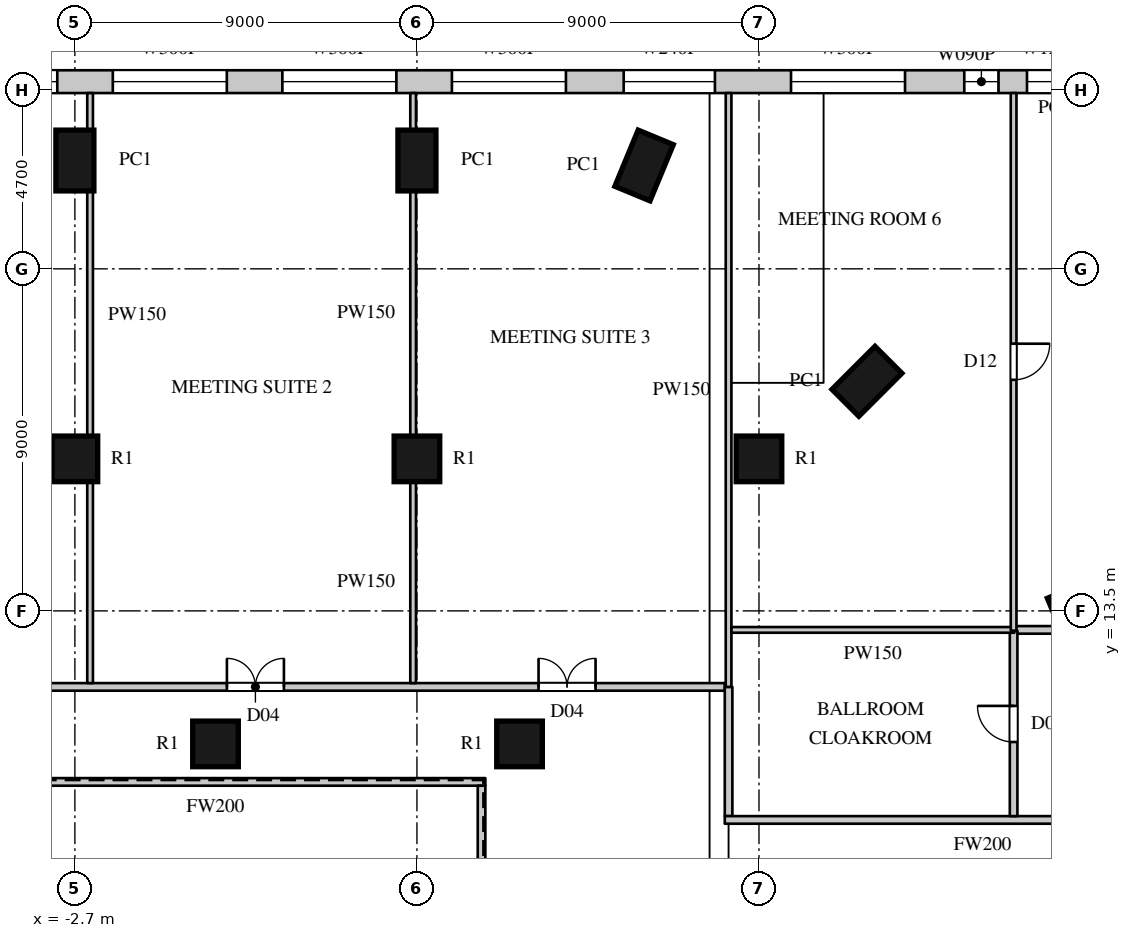
"""IFC4 building model, lengths in metres.
Left out: names, types, materials, properties, quantities, classifications, styles, units other than length and angle.
Written with IfcOpenShell. Run it as: python <this file> out.ifc"""

import sys

from ifc_helpers import new_model, si_unit, direction, frame, frame_2d, origin, origin_2d, place, context, subcontext, project, spatial, rectangle, circle, extrude, element, fill, save


model = new_model("IFC4")
c1 = context("Model", 3, precision=1e-05, world=origin(), true_north=direction((0.0, 1.0)))
c2 = subcontext(c1, "Body", "Model", "MODEL_VIEW")
j1 = project(units=[si_unit("LENGTHUNIT", "METRE"), si_unit("PLANEANGLEUNIT", "RADIAN")], contexts=[c1])
p1 = place(None, origin())
s1 = spatial("IfcSite", under=j1, at=p1, CompositionType="ELEMENT")
p2 = place(p1, origin())
s2 = spatial("IfcBuilding", under=s1, at=p2, CompositionType="ELEMENT")
p3 = place(p2, frame((0.0, 0.0, 36.0)))
s3 = spatial("IfcBuildingStorey", under=s2, at=p3, CompositionType="ELEMENT", Elevation=36.0)
for number, where, z_axis, x_axis in (
    (1, (23.82, 13.677, 0.0), (0.0, 0.0, 1.0), (-0.383, 0.924, 0.0)),
    (2, (18.14, 19.54, 0.0), (0.0, 0.0, 1.0), (-0.707, 0.707, 0.0)),
    (3, (12.277, 25.219, 0.0), (0.0, 0.0, 1.0), (-0.924, 0.383, 0.0)),
    (4, (6.3, 25.35, 0.0), (0.0, 0.0, 1.0), (-1.0, 0.0, 0.0)),
    (5, (-2.7, 25.35, 0.0), (0.0, 0.0, 1.0), (-1.0, 0.0, 0.0)),
):
    element("IfcColumn", number, at=place(p3, frame(where, z_axis=z_axis, x_axis=x_axis)), inside=s3, PredefinedType="COLUMN", context=c2, shape_type="SweptSolid", body=[
        extrude(rectangle(XDim=1.0, YDim=1.6, at=origin_2d()), origin(), (0.0, 0.0, 1.0), 8.0),
    ])
for number, where, z_axis, x_axis in (
    (6, (-2.7, 17.5, 0.0), (0.0, 0.0, 1.0), (1.0, 0.0, 0.0)),
    (7, (6.3, 17.5, 0.0), (0.0, 0.0, 1.0), (1.0, 0.0, 0.0)),
    (8, (15.3, 17.5, 0.0), (0.0, 0.0, 1.0), (1.0, 0.0, 0.0)),
    (9, (1.0, 10.0, 0.0), (0.0, 0.0, 1.0), (1.0, 0.0, 0.0)),
    (10, (9.0, 10.0, 0.0), (0.0, 0.0, 1.0), (1.0, 0.0, 0.0)),
):
    element("IfcColumn", number, at=place(p3, frame(where, z_axis=z_axis, x_axis=x_axis)), inside=s3, PredefinedType="COLUMN", context=c2, shape_type="SweptSolid", body=[
        extrude(circle(Radius=0.6, at=origin_2d()), origin(), (0.0, 0.0, 1.0), 8.0),
    ])
p4 = place(p3, frame((24.334, 27.425, 0.0), z_axis=(0.0, 0.0, 1.0), x_axis=(-1.0, 0.0, 0.0)))
e11 = element("IfcWall", 11, at=p4, inside=s3, PredefinedType="ELEMENTEDWALL", context=c2, shape_type="SweptSolid", body=[
    extrude(rectangle(XDim=53.534, YDim=0.6, at=frame_2d((26.767, 0.0))), origin(), (0.0, 0.0, 1.0), 7.6),
])
p5 = place(p4, frame((5.192, 0.0, 1.5)))
e12 = element("IfcOpeningElement", 12, at=p5, cuts=e11, PredefinedType="OPENING", context=c2, shape_type="SweptSolid", body=[
    extrude(rectangle(XDim=3.0, YDim=2.4, at=frame_2d((1.5, 1.2))), frame((0.0, 0.31, 0.0), z_axis=(0.0, -1.0, 0.0), x_axis=(1.0, 0.0, 0.0)), (0.0, 0.0, 1.0), 0.62),
])
p6 = place(p4, frame((14.114, 0.0, 1.5)))
e13 = element("IfcOpeningElement", 13, at=p6, cuts=e11, PredefinedType="OPENING", context=c2, shape_type="SweptSolid", body=[
    extrude(rectangle(XDim=3.0, YDim=2.4, at=frame_2d((1.5, 1.2))), frame((0.0, 0.31, 0.0), z_axis=(0.0, -1.0, 0.0), x_axis=(1.0, 0.0, 0.0)), (0.0, 0.0, 1.0), 0.62),
])
p7 = place(p4, frame((18.575, 0.0, 1.5)))
e14 = element("IfcOpeningElement", 14, at=p7, cuts=e11, PredefinedType="OPENING", context=c2, shape_type="SweptSolid", body=[
    extrude(rectangle(XDim=3.0, YDim=2.4, at=frame_2d((1.5, 1.2))), frame((0.0, 0.31, 0.0), z_axis=(0.0, -1.0, 0.0), x_axis=(1.0, 0.0, 0.0)), (0.0, 0.0, 1.0), 0.62),
])
p8 = place(p4, frame((23.037, 0.0, 1.5)))
e15 = element("IfcOpeningElement", 15, at=p8, cuts=e11, PredefinedType="OPENING", context=c2, shape_type="SweptSolid", body=[
    extrude(rectangle(XDim=3.0, YDim=2.4, at=frame_2d((1.5, 1.2))), frame((0.0, 0.31, 0.0), z_axis=(0.0, -1.0, 0.0), x_axis=(1.0, 0.0, 0.0)), (0.0, 0.0, 1.0), 0.62),
])
p9 = place(p4, frame((27.498, 0.0, 1.5)))
e16 = element("IfcOpeningElement", 16, at=p9, cuts=e11, PredefinedType="OPENING", context=c2, shape_type="SweptSolid", body=[
    extrude(rectangle(XDim=3.0, YDim=2.4, at=frame_2d((1.5, 1.2))), frame((0.0, 0.31, 0.0), z_axis=(0.0, -1.0, 0.0), x_axis=(1.0, 0.0, 0.0)), (0.0, 0.0, 1.0), 0.62),
])
p10 = place(p4, frame((36.42, 0.0, 1.5)))
e17 = element("IfcOpeningElement", 17, at=p10, cuts=e11, PredefinedType="OPENING", context=c2, shape_type="SweptSolid", body=[
    extrude(rectangle(XDim=3.0, YDim=2.4, at=frame_2d((1.5, 1.2))), frame((0.0, 0.31, 0.0), z_axis=(0.0, -1.0, 0.0), x_axis=(1.0, 0.0, 0.0)), (0.0, 0.0, 1.0), 0.62),
])
p11 = place(p4, frame((40.882, 0.0, 1.5)))
e18 = element("IfcOpeningElement", 18, at=p11, cuts=e11, PredefinedType="OPENING", context=c2, shape_type="SweptSolid", body=[
    extrude(rectangle(XDim=3.0, YDim=2.4, at=frame_2d((1.5, 1.2))), frame((0.0, 0.31, 0.0), z_axis=(0.0, -1.0, 0.0), x_axis=(1.0, 0.0, 0.0)), (0.0, 0.0, 1.0), 0.62),
])
p12 = place(p4, frame((45.343, 0.0, 1.5)))
e19 = element("IfcOpeningElement", 19, at=p12, cuts=e11, PredefinedType="OPENING", context=c2, shape_type="SweptSolid", body=[
    extrude(rectangle(XDim=3.0, YDim=2.4, at=frame_2d((1.5, 1.2))), frame((0.0, 0.31, 0.0), z_axis=(0.0, -1.0, 0.0), x_axis=(1.0, 0.0, 0.0)), (0.0, 0.0, 1.0), 0.62),
])
p13 = place(p4, frame((49.804, 0.0, 1.5)))
e20 = element("IfcOpeningElement", 20, at=p13, cuts=e11, PredefinedType="OPENING", context=c2, shape_type="SweptSolid", body=[
    extrude(rectangle(XDim=3.0, YDim=2.4, at=frame_2d((1.5, 1.2))), frame((0.0, 0.31, 0.0), z_axis=(0.0, -1.0, 0.0), x_axis=(1.0, 0.0, 0.0)), (0.0, 0.0, 1.0), 0.62),
])
p14 = place(p4, frame((0.782, 0.0, 1.5)))
e21 = element("IfcOpeningElement", 21, at=p14, cuts=e11, PredefinedType="OPENING", context=c2, shape_type="SweptSolid", body=[
    extrude(rectangle(XDim=1.2, YDim=2.4, at=frame_2d((0.6, 1.2))), frame((0.0, 0.31, 0.0), z_axis=(0.0, -1.0, 0.0), x_axis=(1.0, 0.0, 0.0)), (0.0, 0.0, 1.0), 0.62),
])
p15 = place(p4, frame((2.733, 0.0, 1.5)))
e22 = element("IfcOpeningElement", 22, at=p15, cuts=e11, PredefinedType="OPENING", context=c2, shape_type="SweptSolid", body=[
    extrude(rectangle(XDim=0.9, YDim=2.4, at=frame_2d((0.45, 1.2))), frame((0.0, 0.31, 0.0), z_axis=(0.0, -1.0, 0.0), x_axis=(1.0, 0.0, 0.0)), (0.0, 0.0, 1.0), 0.62),
])
p16 = place(p4, frame((10.194, 0.0, 1.5)))
e23 = element("IfcOpeningElement", 23, at=p16, cuts=e11, PredefinedType="OPENING", context=c2, shape_type="SweptSolid", body=[
    extrude(rectangle(XDim=2.4, YDim=2.4, at=frame_2d((1.2, 1.2))), frame((0.0, 0.31, 0.0), z_axis=(0.0, -1.0, 0.0), x_axis=(1.0, 0.0, 0.0)), (0.0, 0.0, 1.0), 0.62),
])
p17 = place(p4, frame((32.047, 0.0, 1.5)))
e24 = element("IfcOpeningElement", 24, at=p17, cuts=e11, PredefinedType="OPENING", context=c2, shape_type="SweptSolid", body=[
    extrude(rectangle(XDim=2.4, YDim=2.4, at=frame_2d((1.2, 1.2))), frame((0.0, 0.31, 0.0), z_axis=(0.0, -1.0, 0.0), x_axis=(1.0, 0.0, 0.0)), (0.0, 0.0, 1.0), 0.62),
])
p18 = place(p3, frame((-10.4, 11.5, 0.0), z_axis=(0.0, 0.0, 1.0), x_axis=(1.0, 0.0, 0.0)))
e25 = element("IfcWall", 25, at=p18, inside=s3, PredefinedType="PARTITIONING", context=c2, shape_type="SweptSolid", body=[
    extrude(rectangle(XDim=24.8, YDim=0.2, at=frame_2d((12.4, 0.0))), origin(), (0.0, 0.0, 1.0), 7.598),
])
p19 = place(p18, frame((3.7, 0.0, 0.0)))
e26 = element("IfcOpeningElement", 26, at=p19, cuts=e25, PredefinedType="OPENING", context=c2, shape_type="SweptSolid", body=[
    extrude(rectangle(XDim=1.5, YDim=2.2, at=frame_2d((0.75, 1.1))), frame((0.0, 0.11, 0.0), z_axis=(0.0, -1.0, 0.0), x_axis=(1.0, 0.0, 0.0)), (0.0, 0.0, 1.0), 0.22),
])
p20 = place(p18, frame((11.7, 0.0, 0.0)))
e27 = element("IfcOpeningElement", 27, at=p20, cuts=e25, PredefinedType="OPENING", context=c2, shape_type="SweptSolid", body=[
    extrude(rectangle(XDim=1.5, YDim=2.2, at=frame_2d((0.75, 1.1))), frame((0.0, 0.11, 0.0), z_axis=(0.0, -1.0, 0.0), x_axis=(1.0, 0.0, 0.0)), (0.0, 0.0, 1.0), 0.22),
])
p21 = place(p18, frame((19.9, 0.0, 0.0)))
e28 = element("IfcOpeningElement", 28, at=p21, cuts=e25, PredefinedType="OPENING", context=c2, shape_type="SweptSolid", body=[
    extrude(rectangle(XDim=1.5, YDim=2.2, at=frame_2d((0.75, 1.1))), frame((0.0, 0.11, 0.0), z_axis=(0.0, -1.0, 0.0), x_axis=(1.0, 0.0, 0.0)), (0.0, 0.0, 1.0), 0.22),
])
p22 = place(p3, frame((-6.1, 9.0, 0.0), z_axis=(0.0, 0.0, 1.0), x_axis=(1.0, 0.0, 0.0)))
e29 = element("IfcWall", 29, at=p22, inside=s3, PredefinedType="PARTITIONING", context=c2, shape_type="SweptSolid", body=[
    extrude(rectangle(XDim=14.2, YDim=0.2, at=frame_2d((7.1, 0.0))), origin(), (0.0, 0.0, 1.0), 7.598),
])
p23 = place(p3, frame((8.0, -8.9, 0.0), z_axis=(0.0, 0.0, 1.0), x_axis=(0.0, 1.0, 0.0)))
e30 = element("IfcWall", 30, at=p23, inside=s3, PredefinedType="PARTITIONING", context=c2, shape_type="SweptSolid", body=[
    extrude(rectangle(XDim=17.8, YDim=0.2, at=frame_2d((8.9, 0.0))), origin(), (0.0, 0.0, 1.0), 7.598),
])
p24 = place(p3, frame((14.5, 8.1, 0.0), z_axis=(0.0, 0.0, 1.0), x_axis=(0.0, 1.0, 0.0)))
e31 = element("IfcWall", 31, at=p24, inside=s3, PredefinedType="PARTITIONING", context=c2, shape_type="SweptSolid", body=[
    extrude(rectangle(XDim=3.4, YDim=0.2, at=frame_2d((1.7, 0.0))), origin(), (0.0, 0.0, 1.0), 7.598),
])
p25 = place(p3, frame((14.4, 8.0, 0.0), z_axis=(0.0, 0.0, 1.0), x_axis=(1.0, 0.0, 0.0)))
e32 = element("IfcWall", 32, at=p25, inside=s3, PredefinedType="PARTITIONING", context=c2, shape_type="SweptSolid", body=[
    extrude(rectangle(XDim=13.57, YDim=0.2, at=frame_2d((6.785, 0.0))), origin(), (0.0, 0.0, 1.0), 7.598),
])
p26 = place(p25, frame((9.75, 0.0, 0.0)))
e33 = element("IfcOpeningElement", 33, at=p26, cuts=e32, PredefinedType="OPENING", context=c2, shape_type="SweptSolid", body=[
    extrude(rectangle(XDim=1.5, YDim=2.4, at=frame_2d((0.75, 1.2))), frame((0.0, 0.11, 0.0), z_axis=(0.0, -1.0, 0.0), x_axis=(1.0, 0.0, 0.0)), (0.0, 0.0, 1.0), 0.22),
])
p27 = place(p3, frame((22.02, 13.0, 0.0), z_axis=(0.0, 0.0, 1.0), x_axis=(1.0, 0.0, 0.0)))
e34 = element("IfcWall", 34, at=p27, inside=s3, PredefinedType="PARTITIONING", context=c2, shape_type="SweptSolid", body=[
    extrude(rectangle(XDim=1.184, YDim=0.2, at=frame_2d((0.592, 0.0))), origin(), (0.0, 0.0, 1.0), 7.598),
])
p28 = place(p3, frame((22.0, 8.1, 0.0), z_axis=(0.0, 0.0, 1.0), x_axis=(0.0, 1.0, 0.0)))
e35 = element("IfcWall", 35, at=p28, inside=s3, PredefinedType="PARTITIONING", context=c2, shape_type="SweptSolid", body=[
    extrude(rectangle(XDim=4.88, YDim=0.2, at=frame_2d((2.44, 0.0))), origin(), (0.0, 0.0, 1.0), 7.598),
])
p29 = place(p28, frame((1.95, 0.0, 0.0)))
e36 = element("IfcOpeningElement", 36, at=p29, cuts=e35, PredefinedType="OPENING", context=c2, shape_type="SweptSolid", body=[
    extrude(rectangle(XDim=0.95, YDim=2.2, at=frame_2d((0.475, 1.1))), frame((0.0, 0.11, 0.0), z_axis=(0.0, -1.0, 0.0), x_axis=(1.0, 0.0, 0.0)), (0.0, 0.0, 1.0), 0.22),
])
p30 = place(p3, frame((-2.3, 11.6, 0.0), z_axis=(0.0, 0.0, 1.0), x_axis=(0.0, 1.0, 0.0)))
e37 = element("IfcWall", 37, at=p30, inside=s3, PredefinedType="PARTITIONING", context=c2, shape_type="SweptSolid", body=[
    extrude(rectangle(XDim=5.406, YDim=0.15, at=frame_2d((2.703, 0.0))), origin(), (0.0, 0.0, 1.0), 7.598),
])
p31 = place(p3, frame((-2.3, 17.994, 0.0), z_axis=(0.0, 0.0, 1.0), x_axis=(0.0, 1.0, 0.0)))
e38 = element("IfcWall", 38, at=p31, inside=s3, PredefinedType="PARTITIONING", context=c2, shape_type="SweptSolid", body=[
    extrude(rectangle(XDim=6.556, YDim=0.15, at=frame_2d((3.278, 0.0))), origin(), (0.0, 0.0, 1.0), 7.598),
])
p32 = place(p3, frame((-2.3, 26.15, 0.0), z_axis=(0.0, 0.0, 1.0), x_axis=(0.0, 1.0, 0.0)))
e39 = element("IfcWall", 39, at=p32, inside=s3, PredefinedType="PARTITIONING", context=c2, shape_type="SweptSolid", body=[
    extrude(rectangle(XDim=0.975, YDim=0.15, at=frame_2d((0.488, 0.0))), origin(), (0.0, 0.0, 1.0), 7.598),
])
p33 = place(p3, frame((6.2, 11.6, 0.0), z_axis=(0.0, 0.0, 1.0), x_axis=(0.0, 1.0, 0.0)))
e40 = element("IfcWall", 40, at=p33, inside=s3, PredefinedType="PARTITIONING", context=c2, shape_type="SweptSolid", body=[
    extrude(rectangle(XDim=5.3, YDim=0.15, at=frame_2d((2.65, 0.0))), origin(), (0.0, 0.0, 1.0), 7.598),
])
p34 = place(p3, frame((6.2, 18.1, 0.0), z_axis=(0.0, 0.0, 1.0), x_axis=(0.0, 1.0, 0.0)))
e41 = element("IfcWall", 41, at=p34, inside=s3, PredefinedType="PARTITIONING", context=c2, shape_type="SweptSolid", body=[
    extrude(rectangle(XDim=6.45, YDim=0.15, at=frame_2d((3.225, 0.0))), origin(), (0.0, 0.0, 1.0), 7.598),
])
p35 = place(p3, frame((6.2, 26.15, 0.0), z_axis=(0.0, 0.0, 1.0), x_axis=(0.0, 1.0, 0.0)))
e42 = element("IfcWall", 42, at=p35, inside=s3, PredefinedType="PARTITIONING", context=c2, shape_type="SweptSolid", body=[
    extrude(rectangle(XDim=0.975, YDim=0.15, at=frame_2d((0.488, 0.0))), origin(), (0.0, 0.0, 1.0), 7.598),
])
p36 = place(p3, frame((14.5, 11.5, 0.0), z_axis=(0.0, 0.0, 1.0), x_axis=(0.0, 1.0, 0.0)))
e43 = element("IfcWall", 43, at=p36, inside=s3, PredefinedType="PARTITIONING", context=c2, shape_type="SweptSolid", body=[
    extrude(rectangle(XDim=15.625, YDim=0.15, at=frame_2d((7.812, 0.0))), origin(), (0.0, 0.0, 1.0), 7.598),
])
p37 = place(p3, frame((14.575, 13.0, 0.0), z_axis=(0.0, 0.0, 1.0), x_axis=(1.0, 0.0, 0.0)))
e44 = element("IfcWall", 44, at=p37, inside=s3, PredefinedType="PARTITIONING", context=c2, shape_type="SweptSolid", body=[
    extrude(rectangle(XDim=7.445, YDim=0.15, at=frame_2d((3.723, 0.0))), origin(), (0.0, 0.0, 1.0), 7.598),
])
p38 = place(p3, frame((22.0, 12.98, 0.0), z_axis=(0.0, 0.0, 1.0), x_axis=(0.0, 1.0, 0.0)))
e45 = element("IfcWall", 45, at=p38, inside=s3, PredefinedType="PARTITIONING", context=c2, shape_type="SweptSolid", body=[
    extrude(rectangle(XDim=14.145, YDim=0.15, at=frame_2d((7.073, 0.0))), origin(), (0.0, 0.0, 1.0), 7.598),
])
p39 = place(p38, frame((6.6, 0.0, 0.0)))
e46 = element("IfcOpeningElement", 46, at=p39, cuts=e45, PredefinedType="OPENING", context=c2, shape_type="SweptSolid", body=[
    extrude(rectangle(XDim=0.95, YDim=2.2, at=frame_2d((0.475, 1.1))), frame((0.0, 0.085, 0.0), z_axis=(0.0, -1.0, 0.0), x_axis=(1.0, 0.0, 0.0)), (0.0, 0.0, 1.0), 0.17),
])
p40 = place(p5, origin())
e47 = element("IfcWindow", 47, at=p40, inside=s3, PartitioningType="SINGLE_PANEL", PredefinedType="WINDOW", context=c2, shape_type="SweptSolid", body=[
    extrude(rectangle(XDim=3.0, YDim=2.4, at=frame_2d((1.5, 1.2))), frame((0.0, 0.06, 0.0), z_axis=(0.0, -1.0, 0.0), x_axis=(1.0, 0.0, 0.0)), (0.0, 0.0, 1.0), 0.06),
])
fill(e12, e47)
p41 = place(p6, origin())
e48 = element("IfcWindow", 48, at=p41, inside=s3, PartitioningType="SINGLE_PANEL", PredefinedType="WINDOW", context=c2, shape_type="SweptSolid", body=[
    extrude(rectangle(XDim=3.0, YDim=2.4, at=frame_2d((1.5, 1.2))), frame((0.0, 0.06, 0.0), z_axis=(0.0, -1.0, 0.0), x_axis=(1.0, 0.0, 0.0)), (0.0, 0.0, 1.0), 0.06),
])
fill(e13, e48)
p42 = place(p7, origin())
e49 = element("IfcWindow", 49, at=p42, inside=s3, PartitioningType="SINGLE_PANEL", PredefinedType="WINDOW", context=c2, shape_type="SweptSolid", body=[
    extrude(rectangle(XDim=3.0, YDim=2.4, at=frame_2d((1.5, 1.2))), frame((0.0, 0.06, 0.0), z_axis=(0.0, -1.0, 0.0), x_axis=(1.0, 0.0, 0.0)), (0.0, 0.0, 1.0), 0.06),
])
fill(e14, e49)
p43 = place(p8, origin())
e50 = element("IfcWindow", 50, at=p43, inside=s3, PartitioningType="SINGLE_PANEL", PredefinedType="WINDOW", context=c2, shape_type="SweptSolid", body=[
    extrude(rectangle(XDim=3.0, YDim=2.4, at=frame_2d((1.5, 1.2))), frame((0.0, 0.06, 0.0), z_axis=(0.0, -1.0, 0.0), x_axis=(1.0, 0.0, 0.0)), (0.0, 0.0, 1.0), 0.06),
])
fill(e15, e50)
p44 = place(p9, origin())
e51 = element("IfcWindow", 51, at=p44, inside=s3, PartitioningType="SINGLE_PANEL", PredefinedType="WINDOW", context=c2, shape_type="SweptSolid", body=[
    extrude(rectangle(XDim=3.0, YDim=2.4, at=frame_2d((1.5, 1.2))), frame((0.0, 0.06, 0.0), z_axis=(0.0, -1.0, 0.0), x_axis=(1.0, 0.0, 0.0)), (0.0, 0.0, 1.0), 0.06),
])
fill(e16, e51)
p45 = place(p20, origin())
e52 = element("IfcDoor", 52, at=p45, inside=s3, OperationType="DOUBLE_DOOR_SINGLE_SWING", PredefinedType="DOOR", context=c2, shape_type="SweptSolid", body=[
    extrude(rectangle(XDim=1.5, YDim=2.2, at=frame_2d((0.75, 1.1))), frame((0.0, 0.025, 0.0), z_axis=(0.0, -1.0, 0.0), x_axis=(1.0, 0.0, 0.0)), (0.0, 0.0, 1.0), 0.05),
])
fill(e27, e52)
p46 = place(p21, origin())
e53 = element("IfcDoor", 53, at=p46, inside=s3, OperationType="DOUBLE_DOOR_SINGLE_SWING", PredefinedType="DOOR", context=c2, shape_type="SweptSolid", body=[
    extrude(rectangle(XDim=1.5, YDim=2.2, at=frame_2d((0.75, 1.1))), frame((0.0, 0.025, 0.0), z_axis=(0.0, -1.0, 0.0), x_axis=(1.0, 0.0, 0.0)), (0.0, 0.0, 1.0), 0.05),
])
fill(e28, e53)
p47 = place(p29, origin())
e54 = element("IfcDoor", 54, at=p47, inside=s3, OperationType="SINGLE_SWING_RIGHT", PredefinedType="DOOR", context=c2, shape_type="SweptSolid", body=[
    extrude(rectangle(XDim=0.95, YDim=2.2, at=frame_2d((0.475, 1.1))), frame((0.0, 0.025, 0.0), z_axis=(0.0, -1.0, 0.0), x_axis=(1.0, 0.0, 0.0)), (0.0, 0.0, 1.0), 0.05),
])
fill(e36, e54)
p48 = place(p39, origin())
e55 = element("IfcDoor", 55, at=p48, inside=s3, OperationType="SINGLE_SWING_LEFT", PredefinedType="DOOR", context=c2, shape_type="SweptSolid", body=[
    extrude(rectangle(XDim=0.95, YDim=2.2, at=frame_2d((0.475, 1.1))), frame((0.0, 0.025, 0.0), z_axis=(0.0, -1.0, 0.0), x_axis=(1.0, 0.0, 0.0)), (0.0, 0.0, 1.0), 0.05),
])
fill(e46, e55)
p49 = place(p14, origin())
e56 = element("IfcWindow", 56, at=p49, inside=s3, PartitioningType="SINGLE_PANEL", PredefinedType="WINDOW", context=c2, shape_type="SweptSolid", body=[
    extrude(rectangle(XDim=1.2, YDim=2.4, at=frame_2d((0.6, 1.2))), frame((0.0, 0.06, 0.0), z_axis=(0.0, -1.0, 0.0), x_axis=(1.0, 0.0, 0.0)), (0.0, 0.0, 1.0), 0.06),
])
fill(e21, e56)
p50 = place(p15, origin())
e57 = element("IfcWindow", 57, at=p50, inside=s3, PartitioningType="SINGLE_PANEL", PredefinedType="WINDOW", context=c2, shape_type="SweptSolid", body=[
    extrude(rectangle(XDim=0.9, YDim=2.4, at=frame_2d((0.45, 1.2))), frame((0.0, 0.06, 0.0), z_axis=(0.0, -1.0, 0.0), x_axis=(1.0, 0.0, 0.0)), (0.0, 0.0, 1.0), 0.06),
])
fill(e22, e57)
p51 = place(p16, origin())
e58 = element("IfcWindow", 58, at=p51, inside=s3, PartitioningType="SINGLE_PANEL", PredefinedType="WINDOW", context=c2, shape_type="SweptSolid", body=[
    extrude(rectangle(XDim=2.4, YDim=2.4, at=frame_2d((1.2, 1.2))), frame((0.0, 0.06, 0.0), z_axis=(0.0, -1.0, 0.0), x_axis=(1.0, 0.0, 0.0)), (0.0, 0.0, 1.0), 0.06),
])
fill(e23, e58)
save(model, sys.argv[1])
